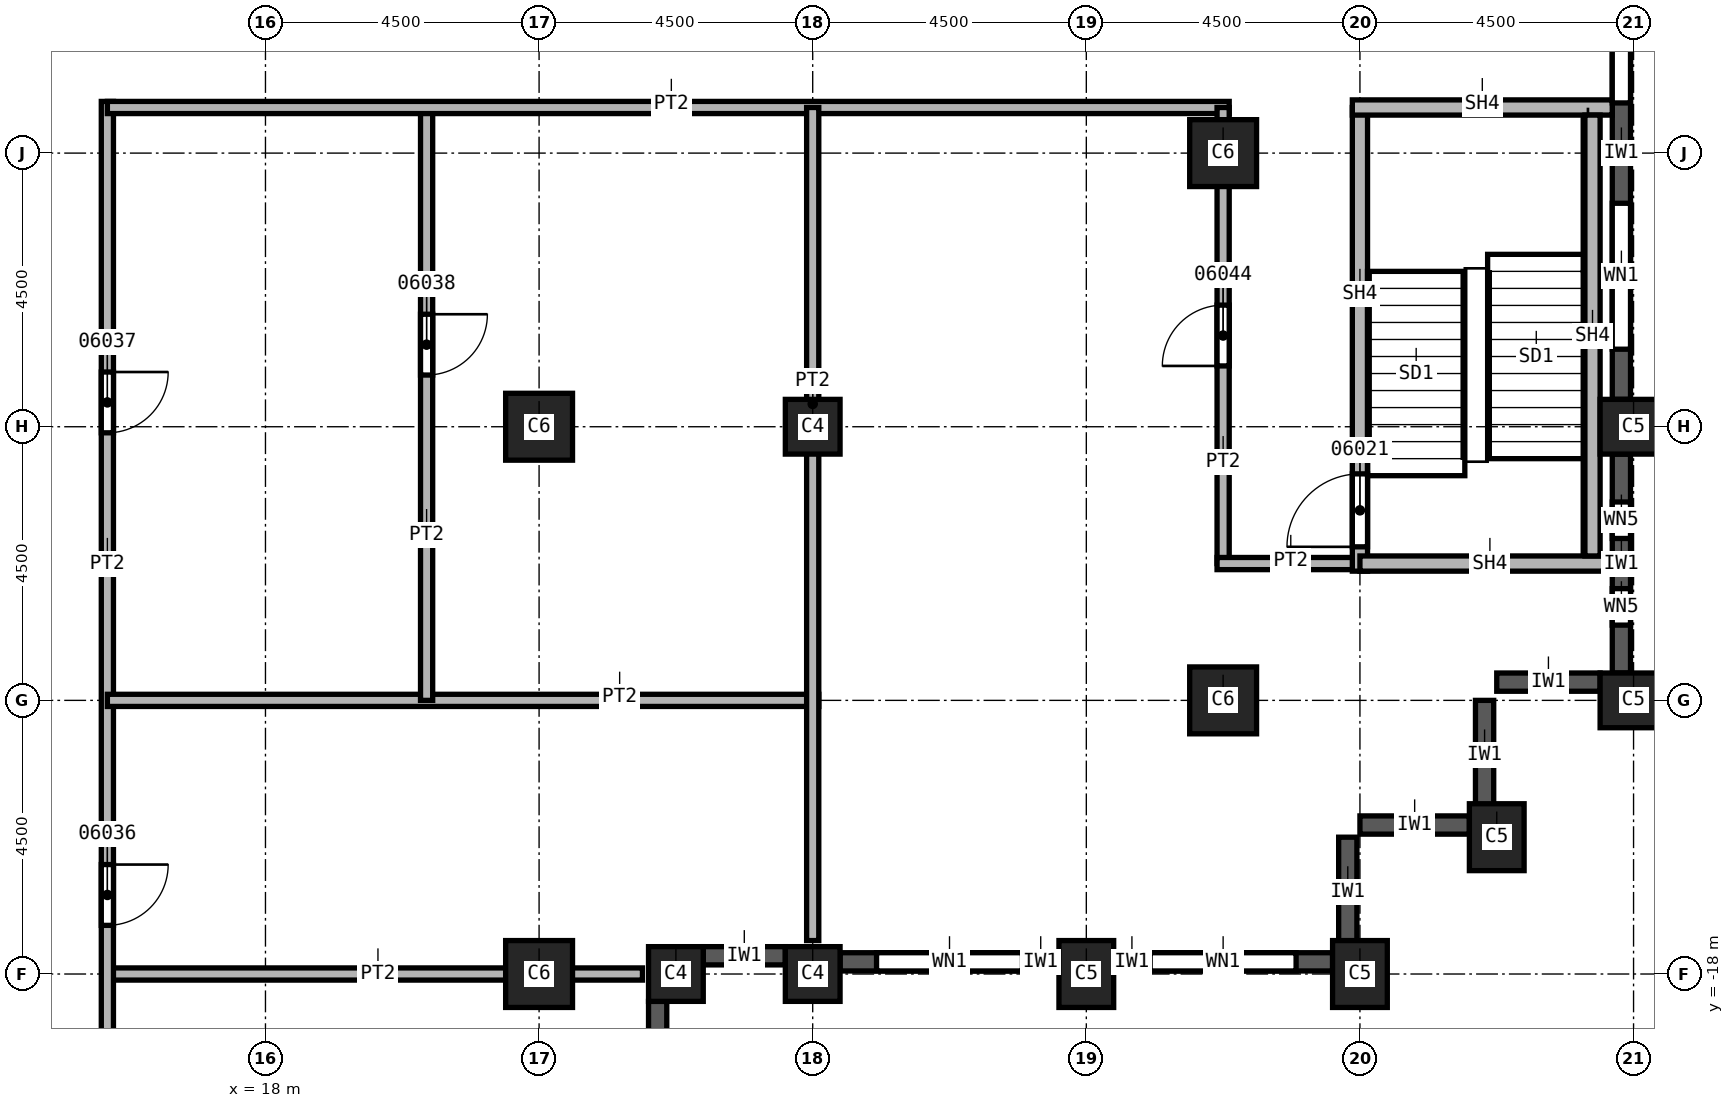
"""IFC4 building model, lengths in metres.
Left out: names, types, materials, properties, quantities, classifications, styles, units other than length and angle.
Written with IfcOpenShell. Run it as: python <this file> out.ifc"""

import sys

from ifc_helpers import new_model, si_unit, direction, frame, frame_2d, origin, origin_2d, place, context, subcontext, project, spatial, rectangle, extrude, element, fill, save


model = new_model("IFC4")
c1 = context("Model", 3, precision=1e-05, world=origin(), true_north=direction((0.0, 1.0)))
c2 = subcontext(c1, "Body", "Model", "MODEL_VIEW")
j1 = project(units=[si_unit("LENGTHUNIT", "METRE"), si_unit("PLANEANGLEUNIT", "RADIAN")], contexts=[c1])
p1 = place(None, origin())
s1 = spatial("IfcSite", under=j1, at=p1, CompositionType="ELEMENT")
p2 = place(p1, origin())
s2 = spatial("IfcBuilding", under=s1, at=p2, CompositionType="ELEMENT")
p3 = place(p2, frame((0.0, 0.0, 126.0)))
s3 = spatial("IfcBuildingStorey", under=s2, at=p3, CompositionType="ELEMENT", Elevation=126.0)
for number, where, z_axis, x_axis in (
    (1, (40.5, -9.0, 0.0), (0.0, 0.0, 1.0), (0.0, 1.0, 0.0)),
    (2, (40.5, -13.5, 0.0), (0.0, 0.0, 1.0), (0.0, 1.0, 0.0)),
    (3, (38.25, -15.75, 0.0), (0.0, 0.0, 1.0), (1.0, 0.0, 0.0)),
    (4, (31.5, -18.0, 0.0), (0.0, 0.0, 1.0), (1.0, 0.0, 0.0)),
    (5, (36.0, -18.0, 0.0), (0.0, 0.0, 1.0), (1.0, 0.0, 0.0)),
):
    element("IfcColumn", number, at=place(p3, frame(where, z_axis=z_axis, x_axis=x_axis)), inside=s3, PredefinedType="COLUMN", context=c2, shape_type="SweptSolid", body=[
        extrude(rectangle(XDim=0.9, YDim=1.1, at=origin_2d()), origin(), (0.0, 0.0, 1.0), 3.7),
    ])
for number, where, z_axis, x_axis in (
    (6, (33.75, -4.5, 0.0), (0.0, 0.0, 1.0), (1.0, 0.0, 0.0)),
    (7, (33.75, -13.5, 0.0), (0.0, 0.0, 1.0), (1.0, 0.0, 0.0)),
    (8, (22.5, -9.0, 0.0), (0.0, 0.0, 1.0), (1.0, 0.0, 0.0)),
    (9, (22.5, -18.0, 0.0), (0.0, 0.0, 1.0), (1.0, 0.0, 0.0)),
):
    element("IfcColumn", number, at=place(p3, frame(where, z_axis=z_axis, x_axis=x_axis)), inside=s3, PredefinedType="COLUMN", context=c2, shape_type="SweptSolid", body=[
        extrude(rectangle(XDim=1.1, YDim=1.1, at=origin_2d()), origin(), (0.0, 0.0, 1.0), 3.7),
    ])
for number, where, z_axis, x_axis in (
    (10, (27.0, -9.0, 0.0), (0.0, 0.0, 1.0), (1.0, 0.0, 0.0)),
    (11, (27.0, -18.0, 0.0), (0.0, 0.0, 1.0), (1.0, 0.0, 0.0)),
    (12, (24.75, -18.0, 0.0), (0.0, 0.0, 1.0), (1.0, 0.0, 0.0)),
):
    element("IfcColumn", number, at=place(p3, frame(where, z_axis=z_axis, x_axis=x_axis)), inside=s3, PredefinedType="COLUMN", context=c2, shape_type="SweptSolid", body=[
        extrude(rectangle(XDim=0.9, YDim=0.9, at=origin_2d()), origin(), (0.0, 0.0, 1.0), 3.7),
    ])
for number, where, z_axis, x_axis in (
    (13, (35.8, -17.55, 0.0), (0.0, 0.0, 1.0), (0.0, 1.0, 0.0)),
    (14, (37.8, -15.55, 0.0), (0.0, 0.0, 1.0), (-1.0, 0.0, 0.0)),
    (15, (38.05, -15.3, 0.0), (0.0, 0.0, 1.0), (0.0, 1.0, 0.0)),
):
    element("IfcWall", number, at=place(p3, frame(where, z_axis=z_axis, x_axis=x_axis)), inside=s3, PredefinedType="SOLIDWALL", context=c2, shape_type="SweptSolid", body=[
        extrude(rectangle(XDim=1.8, YDim=0.3, at=frame_2d((0.9, 0.0))), origin(), (0.0, 0.0, 1.0), 3.1),
    ])
p4 = place(p3, frame((39.95, -13.2, 0.0), z_axis=(0.0, 0.0, 1.0), x_axis=(-1.0, 0.0, 0.0)))
e16 = element("IfcWall", 16, at=p4, inside=s3, PredefinedType="SOLIDWALL", context=c2, shape_type="SweptSolid", body=[
    extrude(rectangle(XDim=1.7, YDim=0.3, at=frame_2d((0.85, 0.0))), origin(), (0.0, 0.0, 1.0), 3.1),
])
p5 = place(p3, frame((24.45, -20.35, 0.0), z_axis=(0.0, 0.0, 1.0), x_axis=(0.0, 1.0, 0.0)))
e17 = element("IfcWall", 17, at=p5, inside=s3, PredefinedType="SOLIDWALL", context=c2, shape_type="SweptSolid", body=[
    extrude(rectangle(XDim=1.9, YDim=0.3, at=frame_2d((0.95, 0.0))), origin(), (0.0, 0.0, 1.0), 3.1),
])
p6 = place(p3, frame((25.2, -17.7, 0.0), z_axis=(0.0, 0.0, 1.0), x_axis=(1.0, 0.0, 0.0)))
e18 = element("IfcWall", 18, at=p6, inside=s3, PredefinedType="SOLIDWALL", context=c2, shape_type="SweptSolid", body=[
    extrude(rectangle(XDim=1.35, YDim=0.3, at=frame_2d((0.675, 0.0))), origin(), (0.0, 0.0, 1.0), 3.1),
])
p7 = place(p3, frame((27.45, -17.8, 0.0), z_axis=(0.0, 0.0, 1.0), x_axis=(1.0, 0.0, 0.0)))
e19 = element("IfcWall", 19, at=p7, inside=s3, PredefinedType="SOLIDWALL", context=c2, shape_type="SweptSolid", body=[
    extrude(rectangle(XDim=3.6, YDim=0.3, at=frame_2d((1.8, 0.0))), origin(), (0.0, 0.0, 1.0), 3.1),
])
p8 = place(p7, frame((0.6, 0.0, 0.8)))
e20 = element("IfcOpeningElement", 20, at=p8, cuts=e19, PredefinedType="OPENING", context=c2, shape_type="SweptSolid", body=[
    extrude(rectangle(XDim=2.4, YDim=1.95, at=frame_2d((1.2, 0.975))), frame((0.0, 0.15, 0.0), z_axis=(0.0, -1.0, 0.0), x_axis=(1.0, 0.0, 0.0)), (0.0, 0.0, 1.0), 0.3),
])
p9 = place(p3, frame((31.95, -17.8, 0.0), z_axis=(0.0, 0.0, 1.0), x_axis=(1.0, 0.0, 0.0)))
e21 = element("IfcWall", 21, at=p9, inside=s3, PredefinedType="SOLIDWALL", context=c2, shape_type="SweptSolid", body=[
    extrude(rectangle(XDim=3.6, YDim=0.3, at=frame_2d((1.8, 0.0))), origin(), (0.0, 0.0, 1.0), 3.1),
])
p10 = place(p9, frame((0.6, 0.0, 0.8)))
e22 = element("IfcOpeningElement", 22, at=p10, cuts=e21, PredefinedType="OPENING", context=c2, shape_type="SweptSolid", body=[
    extrude(rectangle(XDim=2.4, YDim=1.95, at=frame_2d((1.2, 0.975))), frame((0.0, 0.15, 0.0), z_axis=(0.0, -1.0, 0.0), x_axis=(1.0, 0.0, 0.0)), (0.0, 0.0, 1.0), 0.3),
])
p11 = place(p3, frame((40.3, -13.05, 0.0), z_axis=(0.0, 0.0, 1.0), x_axis=(0.0, 1.0, 0.0)))
e23 = element("IfcWall", 23, at=p11, inside=s3, PredefinedType="SOLIDWALL", context=c2, shape_type="SweptSolid", body=[
    extrude(rectangle(XDim=3.6, YDim=0.3, at=frame_2d((1.8, 0.0))), origin(), (0.0, 0.0, 1.0), 3.1),
])
p12 = place(p11, frame((0.788, 0.0, 0.8)))
e24 = element("IfcOpeningElement", 24, at=p12, cuts=e23, PredefinedType="OPENING", context=c2, shape_type="SweptSolid", body=[
    extrude(rectangle(XDim=0.6, YDim=1.95, at=frame_2d((0.3, 0.975))), frame((0.0, 0.15, 0.0), z_axis=(0.0, -1.0, 0.0), x_axis=(1.0, 0.0, 0.0)), (0.0, 0.0, 1.0), 0.3),
])
p13 = place(p11, frame((2.212, 0.0, 0.8)))
e25 = element("IfcOpeningElement", 25, at=p13, cuts=e23, PredefinedType="OPENING", context=c2, shape_type="SweptSolid", body=[
    extrude(rectangle(XDim=0.6, YDim=1.95, at=frame_2d((0.3, 0.975))), frame((0.0, 0.15, 0.0), z_axis=(0.0, -1.0, 0.0), x_axis=(1.0, 0.0, 0.0)), (0.0, 0.0, 1.0), 0.3),
])
p14 = place(p3, frame((40.3, -8.55, 0.0), z_axis=(0.0, 0.0, 1.0), x_axis=(0.0, 1.0, 0.0)))
e26 = element("IfcWall", 26, at=p14, inside=s3, PredefinedType="SOLIDWALL", context=c2, shape_type="SweptSolid", body=[
    extrude(rectangle(XDim=8.1, YDim=0.3, at=frame_2d((4.05, 0.0))), origin(), (0.0, 0.0, 1.0), 3.1),
])
p15 = place(p14, frame((0.825, 0.0, 0.8)))
e27 = element("IfcOpeningElement", 27, at=p15, cuts=e26, PredefinedType="OPENING", context=c2, shape_type="SweptSolid", body=[
    extrude(rectangle(XDim=2.4, YDim=1.95, at=frame_2d((1.2, 0.975))), frame((0.0, 0.15, 0.0), z_axis=(0.0, -1.0, 0.0), x_axis=(1.0, 0.0, 0.0)), (0.0, 0.0, 1.0), 0.3),
])
p16 = place(p14, frame((4.875, 0.0, 0.8)))
e28 = element("IfcOpeningElement", 28, at=p16, cuts=e26, PredefinedType="OPENING", context=c2, shape_type="SweptSolid", body=[
    extrude(rectangle(XDim=2.4, YDim=1.95, at=frame_2d((1.2, 0.975))), frame((0.0, 0.15, 0.0), z_axis=(0.0, -1.0, 0.0), x_axis=(1.0, 0.0, 0.0)), (0.0, 0.0, 1.0), 0.3),
])
p17 = place(p3, frame((15.4, -18.0, 0.0), z_axis=(0.0, 0.0, 1.0), x_axis=(1.0, 0.0, 0.0)))
e29 = element("IfcWall", 29, at=p17, inside=s3, PredefinedType="PARTITIONING", context=c2, shape_type="SweptSolid", body=[
    extrude(rectangle(XDim=8.8, YDim=0.2, at=frame_2d((4.4, 0.0))), origin(), (0.0, 0.0, 1.0), 3.7),
])
p18 = place(p3, frame((15.4, -3.65, 0.0), z_axis=(0.0, 0.0, 1.0), x_axis=(0.0, -1.0, 0.0)))
e30 = element("IfcWall", 30, at=p18, inside=s3, PredefinedType="PARTITIONING", context=c2, shape_type="SweptSolid", body=[
    extrude(rectangle(XDim=19.6, YDim=0.2, at=frame_2d((9.8, 0.0))), origin(), (0.0, 0.0, 1.0), 3.7),
])
p19 = place(p18, frame((18.25, 0.0, 0.0)))
e31 = element("IfcOpeningElement", 31, at=p19, cuts=e30, PredefinedType="OPENING", context=c2, shape_type="SweptSolid", body=[
    extrude(rectangle(XDim=1.0, YDim=2.1, at=frame_2d((0.5, 1.05))), frame((0.0, 0.1, 0.0), z_axis=(0.0, -1.0, 0.0), x_axis=(1.0, 0.0, 0.0)), (0.0, 0.0, 1.0), 0.2),
])
p20 = place(p18, frame((12.55, 0.0, 0.0)))
e32 = element("IfcOpeningElement", 32, at=p20, cuts=e30, PredefinedType="OPENING", context=c2, shape_type="SweptSolid", body=[
    extrude(rectangle(XDim=1.0, YDim=2.1, at=frame_2d((0.5, 1.05))), frame((0.0, 0.1, 0.0), z_axis=(0.0, -1.0, 0.0), x_axis=(1.0, 0.0, 0.0)), (0.0, 0.0, 1.0), 0.2),
])
p21 = place(p18, frame((4.45, 0.0, 0.0)))
e33 = element("IfcOpeningElement", 33, at=p21, cuts=e30, PredefinedType="OPENING", context=c2, shape_type="SweptSolid", body=[
    extrude(rectangle(XDim=1.0, YDim=2.1, at=frame_2d((0.5, 1.05))), frame((0.0, 0.1, 0.0), z_axis=(0.0, -1.0, 0.0), x_axis=(1.0, 0.0, 0.0)), (0.0, 0.0, 1.0), 0.2),
])
p22 = place(p3, frame((15.4, -13.5, 0.0), z_axis=(0.0, 0.0, 1.0), x_axis=(1.0, 0.0, 0.0)))
e34 = element("IfcWall", 34, at=p22, inside=s3, PredefinedType="PARTITIONING", context=c2, shape_type="SweptSolid", body=[
    extrude(rectangle(XDim=11.7, YDim=0.2, at=frame_2d((5.85, 0.0))), origin(), (0.0, 0.0, 1.0), 3.7),
])
p23 = place(p3, frame((20.65, -3.75, 0.0), z_axis=(0.0, 0.0, 1.0), x_axis=(0.0, -1.0, 0.0)))
e35 = element("IfcWall", 35, at=p23, inside=s3, PredefinedType="PARTITIONING", context=c2, shape_type="SweptSolid", body=[
    extrude(rectangle(XDim=9.75, YDim=0.2, at=frame_2d((4.875, 0.0))), origin(), (0.0, 0.0, 1.0), 3.7),
])
p24 = place(p23, frame((3.4, 0.0, 0.0)))
e36 = element("IfcOpeningElement", 36, at=p24, cuts=e35, PredefinedType="OPENING", context=c2, shape_type="SweptSolid", body=[
    extrude(rectangle(XDim=1.0, YDim=2.1, at=frame_2d((0.5, 1.05))), frame((0.0, 0.1, 0.0), z_axis=(0.0, -1.0, 0.0), x_axis=(1.0, 0.0, 0.0)), (0.0, 0.0, 1.0), 0.2),
])
p25 = place(p3, frame((33.85, -3.75, 0.0), z_axis=(0.0, 0.0, 1.0), x_axis=(-1.0, 0.0, 0.0)))
e37 = element("IfcWall", 37, at=p25, inside=s3, PredefinedType="PARTITIONING", context=c2, shape_type="SweptSolid", body=[
    extrude(rectangle(XDim=18.45, YDim=0.2, at=frame_2d((9.225, 0.0))), origin(), (0.0, 0.0, 1.0), 3.7),
])
p26 = place(p3, frame((27.0, -3.75, 0.0), z_axis=(0.0, 0.0, 1.0), x_axis=(0.0, -1.0, 0.0)))
e38 = element("IfcWall", 38, at=p26, inside=s3, PredefinedType="PARTITIONING", context=c2, shape_type="SweptSolid", body=[
    extrude(rectangle(XDim=13.7, YDim=0.2, at=frame_2d((6.85, 0.0))), origin(), (0.0, 0.0, 1.0), 3.7),
])
p27 = place(p3, frame((33.75, -11.25, 0.0), z_axis=(0.0, 0.0, 1.0), x_axis=(0.0, 1.0, 0.0)))
e39 = element("IfcWall", 39, at=p27, inside=s3, PredefinedType="PARTITIONING", context=c2, shape_type="SweptSolid", body=[
    extrude(rectangle(XDim=7.5, YDim=0.2, at=frame_2d((3.75, 0.0))), origin(), (0.0, 0.0, 1.0), 3.7),
])
p28 = place(p27, frame((3.25, 0.0, 0.0)))
e40 = element("IfcOpeningElement", 40, at=p28, cuts=e39, PredefinedType="OPENING", context=c2, shape_type="SweptSolid", body=[
    extrude(rectangle(XDim=1.0, YDim=2.1, at=frame_2d((0.5, 1.05))), frame((0.0, 0.1, 0.0), z_axis=(0.0, -1.0, 0.0), x_axis=(1.0, 0.0, 0.0)), (0.0, 0.0, 1.0), 0.2),
])
p29 = place(p3, frame((36.0, -11.25, 0.0), z_axis=(0.0, 0.0, 1.0), x_axis=(-1.0, 0.0, 0.0)))
e41 = element("IfcWall", 41, at=p29, inside=s3, PredefinedType="PARTITIONING", context=c2, shape_type="SweptSolid", body=[
    extrude(rectangle(XDim=2.35, YDim=0.2, at=frame_2d((1.175, 0.0))), origin(), (0.0, 0.0, 1.0), 3.7),
])
p30 = place(p3, frame((36.0, -11.375, 0.0), z_axis=(0.0, 0.0, 1.0), x_axis=(0.0, 1.0, 0.0)))
e42 = element("IfcWall", 42, at=p30, inside=s3, PredefinedType="SOLIDWALL", context=c2, shape_type="SweptSolid", body=[
    extrude(rectangle(XDim=7.625, YDim=0.25, at=frame_2d((3.812, 0.0))), origin(), (0.0, 0.0, 1.0), 3.7),
])
p31 = place(p30, frame((0.4, 0.0, 0.0)))
e43 = element("IfcOpeningElement", 43, at=p31, cuts=e42, PredefinedType="OPENING", context=c2, shape_type="SweptSolid", body=[
    extrude(rectangle(XDim=1.2, YDim=2.1, at=frame_2d((0.6, 1.05))), frame((0.0, 0.125, 0.0), z_axis=(0.0, -1.0, 0.0), x_axis=(1.0, 0.0, 0.0)), (0.0, 0.0, 1.0), 0.25),
])
p32 = place(p3, frame((40.15, -11.25, 0.0), z_axis=(0.0, 0.0, 1.0), x_axis=(-1.0, 0.0, 0.0)))
e44 = element("IfcWall", 44, at=p32, inside=s3, PredefinedType="SOLIDWALL", context=c2, shape_type="SweptSolid", body=[
    extrude(rectangle(XDim=4.15, YDim=0.25, at=frame_2d((2.075, 0.0))), origin(), (0.0, 0.0, 1.0), 3.7),
])
p33 = place(p3, frame((40.15, -3.75, 0.0), z_axis=(0.0, 0.0, 1.0), x_axis=(-1.0, 0.0, 0.0)))
e45 = element("IfcWall", 45, at=p33, inside=s3, PredefinedType="SOLIDWALL", context=c2, shape_type="SweptSolid", body=[
    extrude(rectangle(XDim=4.275, YDim=0.25, at=frame_2d((2.137, 0.0))), origin(), (0.0, 0.0, 1.0), 3.7),
])
p34 = place(p3, frame((39.825, -11.125, 0.0), z_axis=(0.0, 0.0, 1.0), x_axis=(0.0, 1.0, 0.0)))
e46 = element("IfcWall", 46, at=p34, inside=s3, PredefinedType="SOLIDWALL", context=c2, shape_type="SweptSolid", body=[
    extrude(rectangle(XDim=7.25, YDim=0.25, at=frame_2d((3.625, 0.0))), origin(), (0.0, 0.0, 1.0), 3.7),
])
p35 = place(p8, origin())
e47 = element("IfcWindow", 47, at=p35, inside=s3, PartitioningType="SINGLE_PANEL", PredefinedType="WINDOW", context=c2, shape_type="SweptSolid", body=[
    extrude(rectangle(XDim=2.4, YDim=1.95, at=frame_2d((1.2, 0.975))), frame((0.0, 0.03, 0.0), z_axis=(0.0, -1.0, 0.0), x_axis=(1.0, 0.0, 0.0)), (0.0, 0.0, 1.0), 0.06),
])
fill(e20, e47)
p36 = place(p10, origin())
e48 = element("IfcWindow", 48, at=p36, inside=s3, PartitioningType="SINGLE_PANEL", PredefinedType="WINDOW", context=c2, shape_type="SweptSolid", body=[
    extrude(rectangle(XDim=2.4, YDim=1.95, at=frame_2d((1.2, 0.975))), frame((0.0, 0.03, 0.0), z_axis=(0.0, -1.0, 0.0), x_axis=(1.0, 0.0, 0.0)), (0.0, 0.0, 1.0), 0.06),
])
fill(e22, e48)
p37 = place(p15, origin())
e49 = element("IfcWindow", 49, at=p37, inside=s3, PartitioningType="SINGLE_PANEL", PredefinedType="WINDOW", context=c2, shape_type="SweptSolid", body=[
    extrude(rectangle(XDim=2.4, YDim=1.95, at=frame_2d((1.2, 0.975))), frame((0.0, 0.03, 0.0), z_axis=(0.0, -1.0, 0.0), x_axis=(1.0, 0.0, 0.0)), (0.0, 0.0, 1.0), 0.06),
])
fill(e27, e49)
p38 = place(p16, origin())
e50 = element("IfcWindow", 50, at=p38, inside=s3, PartitioningType="SINGLE_PANEL", PredefinedType="WINDOW", context=c2, shape_type="SweptSolid", body=[
    extrude(rectangle(XDim=2.4, YDim=1.95, at=frame_2d((1.2, 0.975))), frame((0.0, 0.03, 0.0), z_axis=(0.0, -1.0, 0.0), x_axis=(1.0, 0.0, 0.0)), (0.0, 0.0, 1.0), 0.06),
])
fill(e28, e50)
p39 = place(p31, origin())
e51 = element("IfcDoor", 51, at=p39, inside=s3, OperationType="SINGLE_SWING_RIGHT", PredefinedType="DOOR", context=c2, shape_type="SweptSolid", body=[
    extrude(rectangle(XDim=1.2, YDim=2.1, at=frame_2d((0.6, 1.05))), frame((0.0, 0.025, 0.0), z_axis=(0.0, -1.0, 0.0), x_axis=(1.0, 0.0, 0.0)), (0.0, 0.0, 1.0), 0.05),
])
fill(e43, e51)
p40 = place(p20, origin())
e52 = element("IfcDoor", 52, at=p40, inside=s3, OperationType="SINGLE_SWING_LEFT", PredefinedType="DOOR", context=c2, shape_type="SweptSolid", body=[
    extrude(rectangle(XDim=1.0, YDim=2.1, at=frame_2d((0.5, 1.05))), frame((0.0, 0.025, 0.0), z_axis=(0.0, -1.0, 0.0), x_axis=(1.0, 0.0, 0.0)), (0.0, 0.0, 1.0), 0.05),
])
fill(e32, e52)
p41 = place(p21, origin())
e53 = element("IfcDoor", 53, at=p41, inside=s3, OperationType="SINGLE_SWING_RIGHT", PredefinedType="DOOR", context=c2, shape_type="SweptSolid", body=[
    extrude(rectangle(XDim=1.0, YDim=2.1, at=frame_2d((0.5, 1.05))), frame((0.0, 0.025, 0.0), z_axis=(0.0, -1.0, 0.0), x_axis=(1.0, 0.0, 0.0)), (0.0, 0.0, 1.0), 0.05),
])
fill(e33, e53)
p42 = place(p24, origin())
e54 = element("IfcDoor", 54, at=p42, inside=s3, OperationType="SINGLE_SWING_LEFT", PredefinedType="DOOR", context=c2, shape_type="SweptSolid", body=[
    extrude(rectangle(XDim=1.0, YDim=2.1, at=frame_2d((0.5, 1.05))), frame((0.0, 0.025, 0.0), z_axis=(0.0, -1.0, 0.0), x_axis=(1.0, 0.0, 0.0)), (0.0, 0.0, 1.0), 0.05),
])
fill(e36, e54)
p43 = place(p28, origin())
e55 = element("IfcDoor", 55, at=p43, inside=s3, OperationType="SINGLE_SWING_LEFT", PredefinedType="DOOR", context=c2, shape_type="SweptSolid", body=[
    extrude(rectangle(XDim=1.0, YDim=2.1, at=frame_2d((0.5, 1.05))), frame((0.0, 0.025, 0.0), z_axis=(0.0, -1.0, 0.0), x_axis=(1.0, 0.0, 0.0)), (0.0, 0.0, 1.0), 0.05),
])
fill(e40, e55)
p44 = place(p12, origin())
e56 = element("IfcWindow", 56, at=p44, inside=s3, PartitioningType="SINGLE_PANEL", PredefinedType="WINDOW", context=c2, shape_type="SweptSolid", body=[
    extrude(rectangle(XDim=0.6, YDim=1.95, at=frame_2d((0.3, 0.975))), frame((0.0, 0.03, 0.0), z_axis=(0.0, -1.0, 0.0), x_axis=(1.0, 0.0, 0.0)), (0.0, 0.0, 1.0), 0.06),
])
fill(e24, e56)
p45 = place(p13, origin())
e57 = element("IfcWindow", 57, at=p45, inside=s3, PartitioningType="SINGLE_PANEL", PredefinedType="WINDOW", context=c2, shape_type="SweptSolid", body=[
    extrude(rectangle(XDim=0.6, YDim=1.95, at=frame_2d((0.3, 0.975))), frame((0.0, 0.03, 0.0), z_axis=(0.0, -1.0, 0.0), x_axis=(1.0, 0.0, 0.0)), (0.0, 0.0, 1.0), 0.06),
])
fill(e25, e57)
save(model, sys.argv[1])
